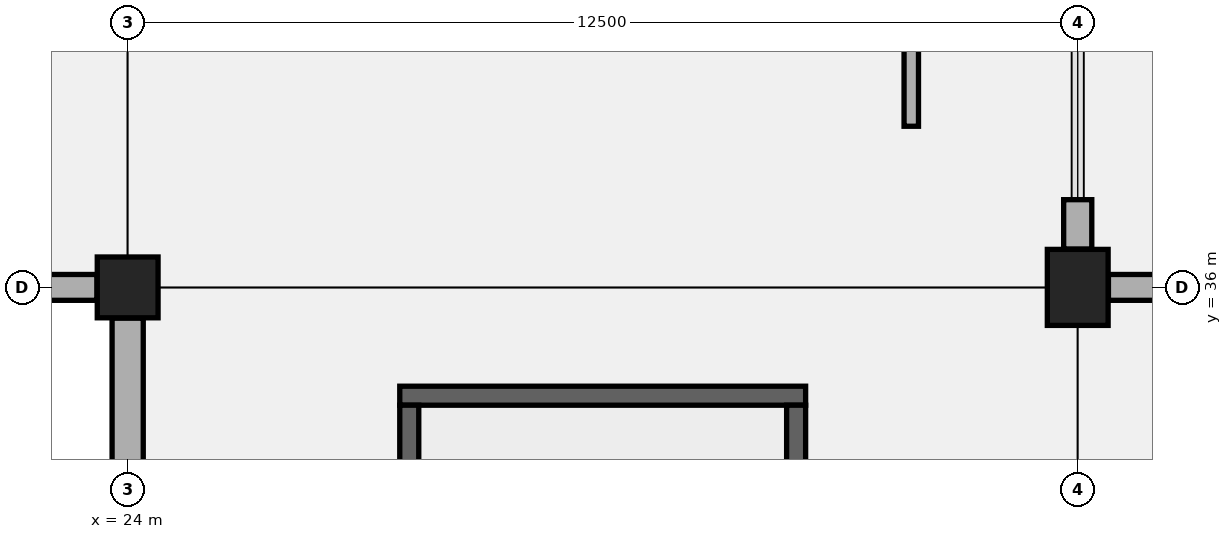
"""IFC4 building model, lengths in metres.
Left out: names, types, materials, properties, quantities, classifications, styles, units other than length and angle.
Written with IfcOpenShell. Run it as: python <this file> out.ifc"""

import sys

from ifc_helpers import new_model, si_unit, direction, frame, frame_2d, origin, origin_2d, place, context, subcontext, project, spatial, rectangle, extrude, element, save


model = new_model("IFC4")
c1 = context("Model", 3, precision=1e-05, world=origin(), true_north=direction((0.0, 1.0)))
c2 = subcontext(c1, "Body", "Model", "MODEL_VIEW")
j1 = project(units=[si_unit("LENGTHUNIT", "METRE"), si_unit("PLANEANGLEUNIT", "RADIAN")], contexts=[c1])
p1 = place(None, origin())
s1 = spatial("IfcSite", under=j1, at=p1, CompositionType="ELEMENT")
p2 = place(p1, origin())
s2 = spatial("IfcBuilding", under=s1, at=p2, CompositionType="ELEMENT")
p3 = place(p2, frame((0.0, 0.0, 10.2)))
s3 = spatial("IfcBuildingStorey", under=s2, at=p3, CompositionType="ELEMENT", Elevation=10.2)
p4 = place(p3, frame((24.0, 36.0, 0.0), z_axis=(0.0, 0.0, 1.0), x_axis=(1.0, 0.0, 0.0)))
e1 = element("IfcColumn", 1, at=p4, inside=s3, PredefinedType="COLUMN", context=c2, shape_type="SweptSolid", body=[
    extrude(rectangle(XDim=0.8, YDim=0.8, at=origin_2d()), origin(), (0.0, 0.0, 1.0), 5.1),
])
p5 = place(p3, frame((36.5, 36.0, 0.0), z_axis=(0.0, 0.0, 1.0), x_axis=(1.0, 0.0, 0.0)))
e2 = element("IfcColumn", 2, at=p5, inside=s3, PredefinedType="COLUMN", context=c2, shape_type="SweptSolid", body=[
    extrude(rectangle(XDim=0.8, YDim=1.0, at=origin_2d()), origin(), (0.0, 0.0, 1.0), 5.1),
])
p6 = place(p3, frame((12.454, 36.0, 0.0), z_axis=(0.0, 0.0, 1.0), x_axis=(1.0, 0.0, 0.0)))
e3 = element("IfcWall", 3, at=p6, inside=s3, PredefinedType="SOLIDWALL", context=c2, shape_type="SweptSolid", body=[
    extrude(rectangle(XDim=11.142, YDim=0.34, at=frame_2d((5.571, 0.0))), origin(), (0.0, 0.0, 1.0), 4.12),
])
p7 = place(p6, frame((1.5, 0.0, 0.95)))
e4 = element("IfcOpeningElement", 4, at=p7, cuts=e3, PredefinedType="OPENING", context=c2, shape_type="SweptSolid", body=[
    extrude(rectangle(XDim=0.9, YDim=2.4, at=frame_2d((0.45, 1.2))), frame((0.0, 0.18, 0.0), z_axis=(0.0, -1.0, 0.0), x_axis=(1.0, 0.0, 0.0)), (0.0, 0.0, 1.0), 0.36),
])
p8 = place(p3, frame((24.0, 24.454, 0.0), z_axis=(0.0, 0.0, 1.0), x_axis=(0.0, 1.0, 0.0)))
e5 = element("IfcWall", 5, at=p8, inside=s3, PredefinedType="SOLIDWALL", context=c2, shape_type="SweptSolid", body=[
    extrude(rectangle(XDim=11.142, YDim=0.41, at=frame_2d((5.571, 0.0))), origin(), (0.0, 0.0, 1.0), 4.12),
])
p9 = place(p8, frame((1.5, 0.0, 0.95)))
e6 = element("IfcOpeningElement", 6, at=p9, cuts=e5, PredefinedType="OPENING", context=c2, shape_type="SweptSolid", body=[
    extrude(rectangle(XDim=1.05, YDim=2.2, at=frame_2d((0.525, 1.1))), frame((0.0, 0.215, 0.0), z_axis=(0.0, -1.0, 0.0), x_axis=(1.0, 0.0, 0.0)), (0.0, 0.0, 1.0), 0.43),
])
p10 = place(p3, frame((36.5, 36.504, 0.0), z_axis=(0.0, 0.0, 1.0), x_axis=(0.0, 1.0, 0.0)))
e7 = element("IfcWall", 7, at=p10, inside=s3, PredefinedType="SOLIDWALL", context=c2, shape_type="SweptSolid", body=[
    extrude(rectangle(XDim=0.65, YDim=0.37, at=frame_2d((0.325, 0.0))), origin(), (0.0, 0.0, 1.0), 4.02),
])
p11 = place(p3, frame((36.904, 36.0, 0.0), z_axis=(0.0, 0.0, 1.0), x_axis=(1.0, 0.0, 0.0)))
e8 = element("IfcWall", 8, at=p11, inside=s3, PredefinedType="SOLIDWALL", context=c2, shape_type="SweptSolid", body=[
    extrude(rectangle(XDim=11.642, YDim=0.34, at=frame_2d((5.821, 0.0))), origin(), (0.0, 0.0, 1.0), 4.02),
])
p12 = place(p11, frame((1.5, 0.0, 0.95)))
e9 = element("IfcOpeningElement", 9, at=p12, cuts=e8, PredefinedType="OPENING", context=c2, shape_type="SweptSolid", body=[
    extrude(rectangle(XDim=1.65, YDim=2.05, at=frame_2d((0.825, 1.025))), frame((0.0, 0.18, 0.0), z_axis=(0.0, -1.0, 0.0), x_axis=(1.0, 0.0, 0.0)), (0.0, 0.0, 1.0), 0.36),
])
p13 = place(p3, frame((27.58, 34.575, 0.0), z_axis=(0.0, 0.0, 1.0), x_axis=(1.0, 0.0, 0.0)))
e10 = element("IfcWall", 10, at=p13, inside=s3, PredefinedType="SHEAR", context=c2, shape_type="SweptSolid", body=[
    extrude(rectangle(XDim=5.34, YDim=0.25, at=frame_2d((2.67, 0.0))), origin(), (0.0, 0.0, 1.0), 4.82),
])
for number, where, z_axis, x_axis in (
    (11, (27.705, 25.55, 0.0), (0.0, 0.0, 1.0), (0.0, 1.0, 0.0)),
    (12, (32.795, 25.55, 0.0), (0.0, 0.0, 1.0), (0.0, 1.0, 0.0)),
):
    element("IfcWall", number, at=place(p3, frame(where, z_axis=z_axis, x_axis=x_axis)), inside=s3, PredefinedType="SHEAR", context=c2, shape_type="SweptSolid", body=[
        extrude(rectangle(XDim=8.9, YDim=0.25, at=frame_2d((4.45, 0.0))), origin(), (0.0, 0.0, 1.0), 4.82),
    ])
p14 = place(p3, frame((34.31, 38.12, 0.0), z_axis=(0.0, 0.0, 1.0), x_axis=(0.0, 1.0, 0.0)))
e13 = element("IfcWall", 13, at=p14, inside=s3, PredefinedType="PARTITIONING", context=c2, shape_type="SweptSolid", body=[
    extrude(rectangle(XDim=9.72, YDim=0.19, at=frame_2d((4.86, 0.0))), origin(), (0.0, 0.0, 1.0), 4.22),
])
p15 = place(p14, frame((1.699, 0.0, 0.0)))
e14 = element("IfcOpeningElement", 14, at=p15, cuts=e13, PredefinedType="OPENING", context=c2, shape_type="SweptSolid", body=[
    extrude(rectangle(XDim=1.09, YDim=2.16, at=frame_2d((0.545, 1.08))), frame((0.0, 0.105, 0.0), z_axis=(0.0, -1.0, 0.0), x_axis=(1.0, 0.0, 0.0)), (0.0, 0.0, 1.0), 0.21),
])
p16 = place(p14, frame((6.624, 0.0, 0.0)))
e15 = element("IfcOpeningElement", 15, at=p16, cuts=e13, PredefinedType="OPENING", context=c2, shape_type="SweptSolid", body=[
    extrude(rectangle(XDim=1.12, YDim=2.18, at=frame_2d((0.56, 1.09))), frame((0.0, 0.105, 0.0), z_axis=(0.0, -1.0, 0.0), x_axis=(1.0, 0.0, 0.0)), (0.0, 0.0, 1.0), 0.21),
])
save(model, sys.argv[1])
